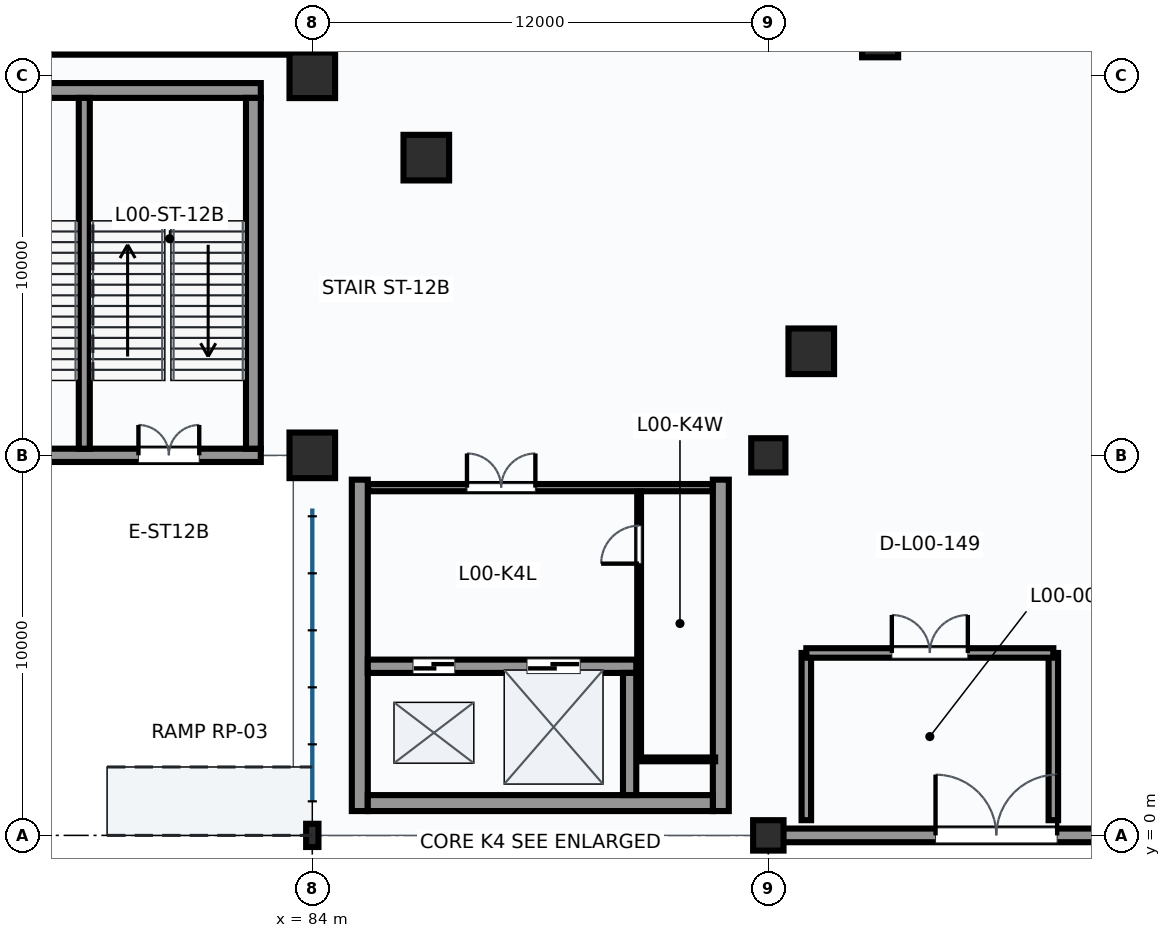
"""IFC4 building model, lengths in metres.
Left out: names, types, materials, properties, quantities, classifications, styles, units other than length and angle.
Written with IfcOpenShell. Run it as: python <this file> out.ifc"""

import sys

from ifc_helpers import new_model, si_unit, direction, frame, frame_2d, origin, origin_2d, place, context, subcontext, project, spatial, rectangle, circle, i_section, extrude, element, fill, save


model = new_model("IFC4")
c1 = context("Model", 3, precision=1e-05, world=origin(), true_north=direction((0.0, 1.0)))
c2 = subcontext(c1, "Body", "Model", "MODEL_VIEW")
j1 = project(units=[si_unit("LENGTHUNIT", "METRE"), si_unit("PLANEANGLEUNIT", "RADIAN")], contexts=[c1])
p1 = place(None, origin())
s1 = spatial("IfcSite", under=j1, at=p1, CompositionType="ELEMENT")
p2 = place(p1, origin())
s2 = spatial("IfcBuilding", under=s1, at=p2, CompositionType="ELEMENT")
p3 = place(p2, origin())
s3 = spatial("IfcBuildingStorey", under=s2, at=p3, CompositionType="ELEMENT", Elevation=0.0)
p4 = place(p3, frame((84.0, 0.0, 0.0), z_axis=(0.0, 0.0, 1.0), x_axis=(1.0, 0.0, 0.0)))
e1 = element("IfcColumn", 1, at=p4, inside=s3, PredefinedType="COLUMN", context=c2, shape_type="SweptSolid", body=[
    extrude(i_section(OverallWidth=0.324, OverallDepth=0.611, WebThickness=0.013, FlangeThickness=0.019, FilletRadius=0.016, at=origin_2d()), origin(), (0.0, 0.0, 1.0), 5.4),
])
for number, where, z_axis, x_axis in (
    (2, (84.0, 10.0, 0.0), (0.0, 0.0, 1.0), (1.0, 0.0, 0.0)),
    (3, (84.0, 20.0, 0.0), (0.0, 0.0, 1.0), (1.0, 0.0, 0.0)),
):
    element("IfcColumn", number, at=place(p3, frame(where, z_axis=z_axis, x_axis=x_axis)), inside=s3, PredefinedType="COLUMN", context=c2, shape_type="SweptSolid", body=[
        extrude(rectangle(XDim=1.2, YDim=1.2, at=origin_2d()), origin(), (0.0, 0.0, 1.0), 5.4),
    ])
p5 = place(p3, frame((96.0, 0.0, 0.0), z_axis=(0.0, 0.0, 1.0), x_axis=(1.0, 0.0, 0.0)))
e4 = element("IfcColumn", 4, at=p5, inside=s3, PredefinedType="COLUMN", context=c2, shape_type="SweptSolid", body=[
    extrude(rectangle(XDim=0.8, YDim=0.8, at=origin_2d()), origin(), (0.0, 0.0, 1.0), 5.4),
])
p6 = place(p3, frame((96.0, 10.0, 0.0), z_axis=(0.0, 0.0, 1.0), x_axis=(1.0, 0.0, 0.0)))
e5 = element("IfcColumn", 5, at=p6, inside=s3, PredefinedType="COLUMN", context=c2, shape_type="SweptSolid", body=[
    extrude(circle(Radius=0.45, at=origin_2d()), origin(), (0.0, 0.0, 1.0), 5.4),
])
p7 = place(p3, frame((87.0, 17.833, 0.0), z_axis=(0.0, 0.0, 1.0), x_axis=(1.0, 0.0, 0.0)))
e6 = element("IfcColumn", 6, at=p7, inside=s3, PredefinedType="COLUMN", context=c2, shape_type="SweptSolid", body=[
    extrude(rectangle(XDim=1.2, YDim=1.2, at=origin_2d()), origin(), (0.0, 0.0, 1.0), 5.4),
])
p8 = place(p3, frame((98.941, 20.948, 0.0), z_axis=(0.0, 0.0, 1.0), x_axis=(1.0, 0.0, 0.0)))
e7 = element("IfcColumn", 7, at=p8, inside=s3, PredefinedType="COLUMN", context=c2, shape_type="SweptSolid", body=[
    extrude(rectangle(XDim=0.95, YDim=0.95, at=origin_2d()), origin(), (0.0, 0.0, 1.0), 5.4),
])
p9 = place(p3, frame((97.13, 12.738, 0.0), z_axis=(0.0, 0.0, 1.0), x_axis=(1.0, 0.0, 0.0)))
e8 = element("IfcColumn", 8, at=p9, inside=s3, PredefinedType="COLUMN", context=c2, shape_type="SweptSolid", body=[
    extrude(rectangle(XDim=1.2, YDim=1.2, at=origin_2d()), origin(), (0.0, 0.0, 1.0), 5.4),
])
p10 = place(p3, frame((96.385, 0.0, 0.0), z_axis=(0.0, 0.0, 1.0), x_axis=(1.0, 0.0, 0.0)))
e9 = element("IfcWall", 9, at=p10, inside=s3, PredefinedType="SOLIDWALL", context=c2, shape_type="SweptSolid", body=[
    extrude(rectangle(XDim=11.23, YDim=0.36, at=frame_2d((5.615, 0.0))), origin(), (0.0, 0.0, 1.0), 4.574),
])
p11 = place(p10, frame((4.015, 0.0, 0.0)))
e10 = element("IfcOpeningElement", 10, at=p11, cuts=e9, PredefinedType="OPENING", context=c2, shape_type="SweptSolid", body=[
    extrude(rectangle(XDim=3.2, YDim=2.4, at=frame_2d((1.6, 1.2))), frame((0.0, 0.19, 0.0), z_axis=(0.0, -1.0, 0.0), x_axis=(1.0, 0.0, 0.0)), (0.0, 0.0, 1.0), 0.38),
])
p12 = place(p3, frame((73.355, 10.0, 0.0), z_axis=(0.0, 0.0, 1.0), x_axis=(1.0, 0.0, 0.0)))
e11 = element("IfcWall", 11, at=p12, inside=s3, PredefinedType="SHEAR", context=c2, shape_type="SweptSolid", body=[
    extrude(rectangle(XDim=9.29, YDim=0.35, at=frame_2d((4.645, 0.0))), origin(), (0.0, 0.0, 1.0), 4.496),
])
p13 = place(p12, frame((1.52, 0.0, 0.0)))
e12 = element("IfcOpeningElement", 12, at=p13, cuts=e11, PredefinedType="OPENING", context=c2, shape_type="SweptSolid", body=[
    extrude(rectangle(XDim=1.8, YDim=2.2, at=frame_2d((0.9, 1.1))), frame((0.0, 0.185, 0.0), z_axis=(0.0, -1.0, 0.0), x_axis=(1.0, 0.0, 0.0)), (0.0, 0.0, 1.0), 0.37),
])
p14 = place(p12, frame((6.07, 0.0, 0.0)))
e13 = element("IfcOpeningElement", 13, at=p14, cuts=e11, PredefinedType="OPENING", context=c2, shape_type="SweptSolid", body=[
    extrude(rectangle(XDim=1.6, YDim=2.2, at=frame_2d((0.8, 1.1))), frame((0.0, 0.185, 0.0), z_axis=(0.0, -1.0, 0.0), x_axis=(1.0, 0.0, 0.0)), (0.0, 0.0, 1.0), 0.37),
])
p15 = place(p3, frame((73.355, 19.6, 0.0), z_axis=(0.0, 0.0, 1.0), x_axis=(1.0, 0.0, 0.0)))
e14 = element("IfcWall", 14, at=p15, inside=s3, PredefinedType="SHEAR", context=c2, shape_type="SweptSolid", body=[
    extrude(rectangle(XDim=9.29, YDim=0.39, at=frame_2d((4.645, 0.0))), origin(), (0.0, 0.0, 1.0), 5.4),
])
p16 = place(p3, frame((82.45, 10.175, 0.0), z_axis=(0.0, 0.0, 1.0), x_axis=(0.0, 1.0, 0.0)))
e15 = element("IfcWall", 15, at=p16, inside=s3, PredefinedType="SHEAR", context=c2, shape_type="SweptSolid", body=[
    extrude(rectangle(XDim=9.23, YDim=0.39, at=frame_2d((4.615, 0.0))), origin(), (0.0, 0.0, 1.0), 5.4),
])
p17 = place(p3, frame((78.0, 10.175, 0.0), z_axis=(0.0, 0.0, 1.0), x_axis=(0.0, 1.0, 0.0)))
e16 = element("IfcWall", 16, at=p17, inside=s3, PredefinedType="SHEAR", context=c2, shape_type="SweptSolid", body=[
    extrude(rectangle(XDim=9.23, YDim=0.29, at=frame_2d((4.615, 0.0))), origin(), (0.0, 0.0, 1.0), 5.4),
])
for number, where, z_axis, x_axis in (
    (17, (85.25, 0.64, 0.0), (0.0, 0.0, 1.0), (0.0, 1.0, 0.0)),
    (18, (94.75, 0.64, 0.0), (0.0, 0.0, 1.0), (0.0, 1.0, 0.0)),
):
    element("IfcWall", number, at=place(p3, frame(where, z_axis=z_axis, x_axis=x_axis)), inside=s3, PredefinedType="SHEAR", context=c2, shape_type="SweptSolid", body=[
        extrude(rectangle(XDim=8.72, YDim=0.42, at=frame_2d((4.36, 0.0))), origin(), (0.0, 0.0, 1.0), 5.4),
    ])
p18 = place(p3, frame((85.46, 0.85, 0.0), z_axis=(0.0, 0.0, 1.0), x_axis=(1.0, 0.0, 0.0)))
e19 = element("IfcWall", 19, at=p18, inside=s3, PredefinedType="SHEAR", context=c2, shape_type="SweptSolid", body=[
    extrude(rectangle(XDim=9.08, YDim=0.42, at=frame_2d((4.54, 0.0))), origin(), (0.0, 0.0, 1.0), 5.4),
])
p19 = place(p3, frame((85.46, 4.45, 0.0), z_axis=(0.0, 0.0, 1.0), x_axis=(1.0, 0.0, 0.0)))
e20 = element("IfcWall", 20, at=p19, inside=s3, PredefinedType="SHEAR", context=c2, shape_type="SweptSolid", body=[
    extrude(rectangle(XDim=7.065, YDim=0.35, at=frame_2d((3.532, 0.0))), origin(), (0.0, 0.0, 1.0), 5.4),
])
p20 = place(p19, frame((1.19, 0.0, 0.0)))
e21 = element("IfcOpeningElement", 21, at=p20, cuts=e20, PredefinedType="OPENING", context=c2, shape_type="SweptSolid", body=[
    extrude(rectangle(XDim=1.1, YDim=2.2, at=frame_2d((0.55, 1.1))), frame((0.0, 0.185, 0.0), z_axis=(0.0, -1.0, 0.0), x_axis=(1.0, 0.0, 0.0)), (0.0, 0.0, 1.0), 0.37),
])
p21 = place(p19, frame((4.19, 0.0, 0.0)))
e22 = element("IfcOpeningElement", 22, at=p21, cuts=e20, PredefinedType="OPENING", context=c2, shape_type="SweptSolid", body=[
    extrude(rectangle(XDim=1.4, YDim=2.3, at=frame_2d((0.7, 1.15))), frame((0.0, 0.185, 0.0), z_axis=(0.0, -1.0, 0.0), x_axis=(1.0, 0.0, 0.0)), (0.0, 0.0, 1.0), 0.37),
])
p22 = place(p3, frame((92.35, 1.06, 0.0), z_axis=(0.0, 0.0, 1.0), x_axis=(0.0, 1.0, 0.0)))
e23 = element("IfcWall", 23, at=p22, inside=s3, PredefinedType="SHEAR", context=c2, shape_type="SweptSolid", body=[
    extrude(rectangle(XDim=3.215, YDim=0.35, at=frame_2d((1.607, 0.0))), origin(), (0.0, 0.0, 1.0), 5.4),
])
p23 = place(p3, frame((85.47, 9.15, 0.0), z_axis=(0.0, 0.0, 1.0), x_axis=(1.0, 0.0, 0.0)))
e24 = element("IfcWall", 24, at=p23, inside=s3, PredefinedType="PARTITIONING", context=c2, shape_type="SweptSolid", body=[
    extrude(rectangle(XDim=9.06, YDim=0.19, at=frame_2d((4.53, 0.0))), origin(), (0.0, 0.0, 1.0), 5.06),
])
p24 = place(p23, frame((2.6, 0.0, 0.0)))
e25 = element("IfcOpeningElement", 25, at=p24, cuts=e24, PredefinedType="OPENING", context=c2, shape_type="SweptSolid", body=[
    extrude(rectangle(XDim=1.8, YDim=2.3, at=frame_2d((0.9, 1.15))), frame((0.0, 0.105, 0.0), z_axis=(0.0, -1.0, 0.0), x_axis=(1.0, 0.0, 0.0)), (0.0, 0.0, 1.0), 0.21),
])
p25 = place(p3, frame((92.6, 2.0, 0.0), z_axis=(0.0, 0.0, 1.0), x_axis=(0.0, 1.0, 0.0)))
e26 = element("IfcWall", 26, at=p25, inside=s3, PredefinedType="PARTITIONING", context=c2, shape_type="SweptSolid", body=[
    extrude(rectangle(XDim=7.05, YDim=0.1, at=frame_2d((3.525, 0.0))), origin(), (0.0, 0.0, 1.0), 5.06),
])
p26 = place(p25, frame((5.15, 0.0, 0.0)))
e27 = element("IfcOpeningElement", 27, at=p26, cuts=e26, PredefinedType="OPENING", context=c2, shape_type="SweptSolid", body=[
    extrude(rectangle(XDim=1.0, YDim=2.1, at=frame_2d((0.5, 1.05))), frame((0.0, 0.06, 0.0), z_axis=(0.0, -1.0, 0.0), x_axis=(1.0, 0.0, 0.0)), (0.0, 0.0, 1.0), 0.12),
])
p27 = place(p3, frame((92.6, 2.0, 0.0), z_axis=(0.0, 0.0, 1.0), x_axis=(1.0, 0.0, 0.0)))
e28 = element("IfcWall", 28, at=p27, inside=s3, PredefinedType="PARTITIONING", context=c2, shape_type="SweptSolid", body=[
    extrude(rectangle(XDim=2.0, YDim=0.1, at=frame_2d((1.0, 0.0))), origin(), (0.0, 0.0, 1.0), 5.06),
])
for number, where, z_axis, x_axis in (
    (29, (103.5, 4.8, 0.0), (0.0, 0.0, 1.0), (0.0, -1.0, 0.0)),
    (30, (97.0, 0.4, 0.0), (0.0, 0.0, 1.0), (0.0, 1.0, 0.0)),
):
    element("IfcWall", number, at=place(p3, frame(where, z_axis=z_axis, x_axis=x_axis)), inside=s3, PredefinedType="SOLIDWALL", context=c2, shape_type="SweptSolid", body=[
        extrude(rectangle(XDim=4.4, YDim=0.25, at=frame_2d((2.2, 0.0))), origin(), (0.0, 0.0, 1.0), 4.623),
    ])
p28 = place(p3, frame((97.0, 4.8, 0.0), z_axis=(0.0, 0.0, 1.0), x_axis=(1.0, 0.0, 0.0)))
e31 = element("IfcWall", 31, at=p28, inside=s3, PredefinedType="SOLIDWALL", context=c2, shape_type="SweptSolid", body=[
    extrude(rectangle(XDim=6.5, YDim=0.25, at=frame_2d((3.25, 0.0))), origin(), (0.0, 0.0, 1.0), 4.63),
])
p29 = place(p28, frame((2.25, 0.0, 0.0)))
e32 = element("IfcOpeningElement", 32, at=p29, cuts=e31, PredefinedType="OPENING", context=c2, shape_type="SweptSolid", body=[
    extrude(rectangle(XDim=2.0, YDim=2.4, at=frame_2d((1.0, 1.2))), frame((0.0, 0.135, 0.0), z_axis=(0.0, -1.0, 0.0), x_axis=(1.0, 0.0, 0.0)), (0.0, 0.0, 1.0), 0.27),
])
p30 = place(p3, frame((83.4, 20.6, 0.0), z_axis=(0.0, 0.0, 1.0), x_axis=(-1.0, 0.0, 0.0)))
e33 = element("IfcWall", 33, at=p30, inside=s3, PredefinedType="PARTITIONING", context=c2, shape_type="SweptSolid", body=[
    extrude(rectangle(XDim=11.0, YDim=0.115, at=frame_2d((5.5, 0.0))), origin(), (0.0, 0.0, 1.0), 5.06),
])
p31 = place(p11, frame((3.2, 0.0, 0.0), z_axis=(0.0, 0.0, 1.0), x_axis=(-1.0, 0.0, 0.0)))
e34 = element("IfcDoor", 34, at=p31, inside=s3, OperationType="DOUBLE_DOOR_SINGLE_SWING", PredefinedType="DOOR", context=c2, shape_type="SweptSolid", body=[
    extrude(rectangle(XDim=3.2, YDim=2.4, at=frame_2d((1.6, 1.2))), frame((0.0, 0.025, 0.0), z_axis=(0.0, -1.0, 0.0), x_axis=(1.0, 0.0, 0.0)), (0.0, 0.0, 1.0), 0.05),
])
fill(e10, e34)
p32 = place(p14, frame((1.6, 0.0, 0.0), z_axis=(0.0, 0.0, 1.0), x_axis=(-1.0, 0.0, 0.0)))
e35 = element("IfcDoor", 35, at=p32, inside=s3, OperationType="DOUBLE_DOOR_SINGLE_SWING", PredefinedType="DOOR", context=c2, shape_type="SweptSolid", body=[
    extrude(rectangle(XDim=1.6, YDim=2.2, at=frame_2d((0.8, 1.1))), frame((0.0, 0.025, 0.0), z_axis=(0.0, -1.0, 0.0), x_axis=(1.0, 0.0, 0.0)), (0.0, 0.0, 1.0), 0.05),
])
fill(e13, e35)
p33 = place(p20, origin())
e36 = element("IfcDoor", 36, at=p33, inside=s3, OperationType="SLIDING_TO_LEFT", PredefinedType="DOOR", context=c2, shape_type="SweptSolid", body=[
    extrude(rectangle(XDim=1.1, YDim=2.2, at=frame_2d((0.55, 1.1))), frame((0.0, 0.025, 0.0), z_axis=(0.0, -1.0, 0.0), x_axis=(1.0, 0.0, 0.0)), (0.0, 0.0, 1.0), 0.05),
])
fill(e21, e36)
p34 = place(p21, origin())
e37 = element("IfcDoor", 37, at=p34, inside=s3, OperationType="SLIDING_TO_LEFT", PredefinedType="DOOR", context=c2, shape_type="SweptSolid", body=[
    extrude(rectangle(XDim=1.4, YDim=2.3, at=frame_2d((0.7, 1.15))), frame((0.0, 0.025, 0.0), z_axis=(0.0, -1.0, 0.0), x_axis=(1.0, 0.0, 0.0)), (0.0, 0.0, 1.0), 0.05),
])
fill(e22, e37)
p35 = place(p24, origin())
e38 = element("IfcDoor", 38, at=p35, inside=s3, OperationType="DOUBLE_DOOR_SINGLE_SWING", PredefinedType="DOOR", context=c2, shape_type="SweptSolid", body=[
    extrude(rectangle(XDim=1.8, YDim=2.3, at=frame_2d((0.9, 1.15))), frame((0.0, 0.025, 0.0), z_axis=(0.0, -1.0, 0.0), x_axis=(1.0, 0.0, 0.0)), (0.0, 0.0, 1.0), 0.05),
])
fill(e25, e38)
p36 = place(p26, origin())
e39 = element("IfcDoor", 39, at=p36, inside=s3, OperationType="SINGLE_SWING_LEFT", PredefinedType="DOOR", context=c2, shape_type="SweptSolid", body=[
    extrude(rectangle(XDim=1.0, YDim=2.1, at=frame_2d((0.5, 1.05))), frame((0.0, 0.025, 0.0), z_axis=(0.0, -1.0, 0.0), x_axis=(1.0, 0.0, 0.0)), (0.0, 0.0, 1.0), 0.05),
])
fill(e27, e39)
p37 = place(p29, origin())
e40 = element("IfcDoor", 40, at=p37, inside=s3, OperationType="DOUBLE_DOOR_SINGLE_SWING", PredefinedType="DOOR", context=c2, shape_type="SweptSolid", body=[
    extrude(rectangle(XDim=2.0, YDim=2.4, at=frame_2d((1.0, 1.2))), frame((0.0, 0.025, 0.0), z_axis=(0.0, -1.0, 0.0), x_axis=(1.0, 0.0, 0.0)), (0.0, 0.0, 1.0), 0.05),
])
fill(e32, e40)
save(model, sys.argv[1])
